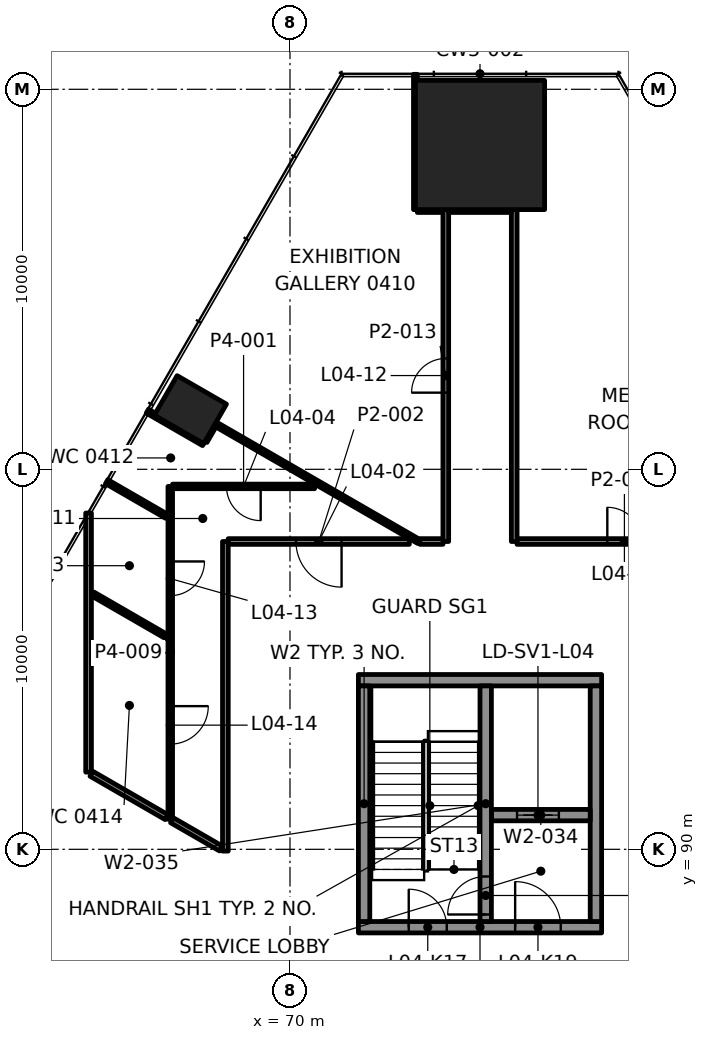
"""IFC4 building model, lengths in metres.
Left out: names, types, materials, properties, quantities, classifications, styles, units other than length and angle.
Written with IfcOpenShell. Run it as: python <this file> out.ifc"""

import sys

from ifc_helpers import new_model, si_unit, direction, frame, frame_2d, origin, origin_2d, place, context, subcontext, project, spatial, rectangle, extrude, element, fill, save


model = new_model("IFC4")
c1 = context("Model", 3, precision=1e-05, world=origin(), true_north=direction((0.0, 1.0)))
c2 = subcontext(c1, "Body", "Model", "MODEL_VIEW")
j1 = project(units=[si_unit("LENGTHUNIT", "METRE"), si_unit("PLANEANGLEUNIT", "RADIAN")], contexts=[c1])
p1 = place(None, origin())
s1 = spatial("IfcSite", under=j1, at=p1, CompositionType="ELEMENT")
p2 = place(p1, origin())
s2 = spatial("IfcBuilding", under=s1, at=p2, CompositionType="ELEMENT")
p3 = place(p2, frame((0.0, 0.0, 21.8)))
s3 = spatial("IfcBuildingStorey", under=s2, at=p3, CompositionType="ELEMENT", Elevation=21.8)
p4 = place(p3, frame((75.0, 108.534, 0.0), z_axis=(0.0, 0.0, 1.0), x_axis=(-1.0, 0.0, 0.0)))
e1 = element("IfcColumn", 1, at=p4, inside=s3, PredefinedType="COLUMN", context=c2, shape_type="SweptSolid", body=[
    extrude(rectangle(XDim=3.4, YDim=3.4, at=origin_2d()), origin(), (0.0, 0.0, 1.0), 4.6),
])
p5 = place(p3, frame((67.379, 101.57, -0.0), z_axis=(0.0, 0.0, 1.0), x_axis=(-0.5, -0.866025403784, 0.0)))
e2 = element("IfcColumn", 2, at=p5, inside=s3, PredefinedType="COLUMN", context=c2, shape_type="SweptSolid", body=[
    extrude(rectangle(XDim=1.2, YDim=1.5, at=origin_2d()), origin(), (0.0, 0.0, 1.0), 4.6),
])
p6 = place(p3, frame((71.8, 87.95, 0.0), z_axis=(0.0, 0.0, 1.0), x_axis=(1.0, 0.0, 0.0)))
e3 = element("IfcWall", 3, at=p6, inside=s3, PredefinedType="SHEAR", context=c2, shape_type="SweptSolid", body=[
    extrude(rectangle(XDim=6.4, YDim=0.3, at=frame_2d((3.2, 0.0))), origin(), (0.0, 0.0, 1.0), 4.3),
])
p7 = place(p6, frame((1.325, 0.0, 0.0)))
e4 = element("IfcOpeningElement", 4, at=p7, cuts=e3, PredefinedType="OPENING", context=c2, shape_type="SweptSolid", body=[
    extrude(rectangle(XDim=1.0, YDim=2.1, at=frame_2d((0.5, 1.05))), frame((0.0, 0.16, 0.0), z_axis=(0.0, -1.0, 0.0), x_axis=(1.0, 0.0, 0.0)), (0.0, 0.0, 1.0), 0.32),
])
p8 = place(p6, frame((4.125, 0.0, 0.0)))
e5 = element("IfcOpeningElement", 5, at=p8, cuts=e3, PredefinedType="OPENING", context=c2, shape_type="SweptSolid", body=[
    extrude(rectangle(XDim=1.2, YDim=2.1, at=frame_2d((0.6, 1.05))), frame((0.0, 0.16, 0.0), z_axis=(0.0, -1.0, 0.0), x_axis=(1.0, 0.0, 0.0)), (0.0, 0.0, 1.0), 0.32),
])
p9 = place(p3, frame((71.8, 94.45, 0.0), z_axis=(0.0, 0.0, 1.0), x_axis=(1.0, 0.0, 0.0)))
e6 = element("IfcWall", 6, at=p9, inside=s3, PredefinedType="SHEAR", context=c2, shape_type="SweptSolid", body=[
    extrude(rectangle(XDim=6.4, YDim=0.3, at=frame_2d((3.2, 0.0))), origin(), (0.0, 0.0, 1.0), 4.3),
])
for number, where, z_axis, x_axis in (
    (7, (71.95, 88.1, 0.0), (0.0, 0.0, 1.0), (0.0, 1.0, 0.0)),
    (8, (78.05, 88.1, 0.0), (0.0, 0.0, 1.0), (0.0, 1.0, 0.0)),
):
    element("IfcWall", number, at=place(p3, frame(where, z_axis=z_axis, x_axis=x_axis)), inside=s3, PredefinedType="SHEAR", context=c2, shape_type="SweptSolid", body=[
        extrude(rectangle(XDim=6.2, YDim=0.3, at=frame_2d((3.1, 0.0))), origin(), (0.0, 0.0, 1.0), 4.3),
    ])
p10 = place(p3, frame((75.3, 90.9, 0.0), z_axis=(0.0, 0.0, 1.0), x_axis=(1.0, 0.0, 0.0)))
e9 = element("IfcWall", 9, at=p10, inside=s3, PredefinedType="SHEAR", context=c2, shape_type="SweptSolid", body=[
    extrude(rectangle(XDim=2.6, YDim=0.3, at=frame_2d((1.3, 0.0))), origin(), (0.0, 0.0, 1.0), 4.3),
])
p11 = place(p10, frame((0.675, 0.0, 0.0)))
e10 = element("IfcOpeningElement", 10, at=p11, cuts=e9, PredefinedType="OPENING", context=c2, shape_type="SweptSolid", body=[
    extrude(rectangle(XDim=1.1, YDim=2.1, at=frame_2d((0.55, 1.05))), frame((0.0, 0.16, 0.0), z_axis=(0.0, -1.0, 0.0), x_axis=(1.0, 0.0, 0.0)), (0.0, 0.0, 1.0), 0.32),
])
p12 = place(p3, frame((75.15, 88.1, 0.0), z_axis=(0.0, 0.0, 1.0), x_axis=(0.0, 1.0, 0.0)))
e11 = element("IfcWall", 11, at=p12, inside=s3, PredefinedType="SHEAR", context=c2, shape_type="SweptSolid", body=[
    extrude(rectangle(XDim=6.2, YDim=0.3, at=frame_2d((3.1, 0.0))), origin(), (0.0, 0.0, 1.0), 4.3),
])
p13 = place(p12, frame((0.185, 0.0, 0.0)))
e12 = element("IfcOpeningElement", 12, at=p13, cuts=e11, PredefinedType="OPENING", context=c2, shape_type="SweptSolid", body=[
    extrude(rectangle(XDim=1.0, YDim=2.1, at=frame_2d((0.5, 1.05))), frame((0.0, 0.16, 0.0), z_axis=(0.0, -1.0, 0.0), x_axis=(1.0, 0.0, 0.0)), (0.0, 0.0, 1.0), 0.32),
])
p14 = place(p3, frame((73.14, 98.1, 0.0), z_axis=(0.0, 0.0, 1.0), x_axis=(-1.0, 0.0, 0.0)))
e13 = element("IfcWall", 13, at=p14, inside=s3, PredefinedType="PARTITIONING", context=c2, shape_type="SweptSolid", body=[
    extrude(rectangle(XDim=4.765, YDim=0.15, at=frame_2d((2.382, 0.0))), origin(), (0.0, 0.0, 1.0), 3.7),
])
p15 = place(p14, frame((1.782, 0.0, 0.0)))
e14 = element("IfcOpeningElement", 14, at=p15, cuts=e13, PredefinedType="OPENING", context=c2, shape_type="SweptSolid", body=[
    extrude(rectangle(XDim=1.2, YDim=2.1, at=frame_2d((0.6, 1.05))), frame((0.0, 0.085, 0.0), z_axis=(0.0, -1.0, 0.0), x_axis=(1.0, 0.0, 0.0)), (0.0, 0.0, 1.0), 0.17),
])
p16 = place(p3, frame((75.975, 98.1, 0.0), z_axis=(0.0, 0.0, 1.0), x_axis=(1.0, 0.0, 0.0)))
e15 = element("IfcWall", 15, at=p16, inside=s3, PredefinedType="PARTITIONING", context=c2, shape_type="SweptSolid", body=[
    extrude(rectangle(XDim=5.649, YDim=0.15, at=frame_2d((2.825, 0.0))), origin(), (0.0, 0.0, 1.0), 3.7),
])
p17 = place(p16, frame((2.375, 0.0, 0.0)))
e16 = element("IfcOpeningElement", 16, at=p17, cuts=e15, PredefinedType="OPENING", context=c2, shape_type="SweptSolid", body=[
    extrude(rectangle(XDim=0.9, YDim=2.1, at=frame_2d((0.45, 1.05))), frame((0.0, 0.085, 0.0), z_axis=(0.0, -1.0, 0.0), x_axis=(1.0, 0.0, 0.0)), (0.0, 0.0, 1.0), 0.17),
])
p18 = place(p3, frame((70.648, 99.55, 0.0), z_axis=(0.0, 0.0, 1.0), x_axis=(-1.0, 0.0, 0.0)))
e17 = element("IfcWall", 17, at=p18, inside=s3, PredefinedType="PARTITIONING", context=c2, shape_type="SweptSolid", body=[
    extrude(rectangle(XDim=3.738, YDim=0.12, at=frame_2d((1.869, 0.0))), origin(), (0.0, 0.0, 1.0), 3.7),
])
p19 = place(p18, frame((1.419, 0.0, 0.0)))
e18 = element("IfcOpeningElement", 18, at=p19, cuts=e17, PredefinedType="OPENING", context=c2, shape_type="SweptSolid", body=[
    extrude(rectangle(XDim=0.9, YDim=2.1, at=frame_2d((0.45, 1.05))), frame((0.0, 0.07, 0.0), z_axis=(0.0, -1.0, 0.0), x_axis=(1.0, 0.0, 0.0)), (0.0, 0.0, 1.0), 0.14),
])
p20 = place(p3, frame((73.351, 106.834, 0.0), z_axis=(0.0, 0.0, 1.0), x_axis=(1.0, 0.0, 0.0)))
e19 = element("IfcWall", 19, at=p20, inside=s3, PredefinedType="PARTITIONING", context=c2, shape_type="SweptSolid", body=[
    extrude(rectangle(XDim=0.674, YDim=0.15, at=frame_2d((0.337, 0.0))), origin(), (0.0, 0.0, 1.0), 3.7),
])
p21 = place(p3, frame((67.764, 100.736, 0.0), z_axis=(0.0, 0.0, 1.0), x_axis=(0.500217018202, 0.865900072007, 0.0)))
e20 = element("IfcWall", 20, at=p21, inside=s3, PredefinedType="PARTITIONING", context=c2, shape_type="SweptSolid", body=[
    extrude(rectangle(XDim=0.47, YDim=0.12, at=frame_2d((0.235, 0.0))), origin(), (0.0, 0.0, 1.0), 3.7),
])
p22 = place(p3, frame((75.9, 98.1, 0.0), z_axis=(0.0, 0.0, 1.0), x_axis=(0.0, 1.0, 0.0)))
e21 = element("IfcWall", 21, at=p22, inside=s3, PredefinedType="PARTITIONING", context=c2, shape_type="SweptSolid", body=[
    extrude(rectangle(XDim=8.733, YDim=0.15, at=frame_2d((4.367, 0.0))), origin(), (0.0, 0.0, 1.0), 3.7),
])
p23 = place(p3, frame((74.1, 98.1, 0.0), z_axis=(0.0, 0.0, 1.0), x_axis=(0.0, 1.0, 0.0)))
e22 = element("IfcWall", 22, at=p23, inside=s3, PredefinedType="PARTITIONING", context=c2, shape_type="SweptSolid", body=[
    extrude(rectangle(XDim=8.734, YDim=0.15, at=frame_2d((4.367, 0.0))), origin(), (0.0, 0.0, 1.0), 3.7),
])
p24 = place(p23, frame((3.917, 0.0, 0.0)))
e23 = element("IfcOpeningElement", 23, at=p24, cuts=e22, PredefinedType="OPENING", context=c2, shape_type="SweptSolid", body=[
    extrude(rectangle(XDim=0.9, YDim=2.1, at=frame_2d((0.45, 1.05))), frame((0.0, 0.085, 0.0), z_axis=(0.0, -1.0, 0.0), x_axis=(1.0, 0.0, 0.0)), (0.0, 0.0, 1.0), 0.17),
])
p25 = place(p3, frame((73.3, 106.834, 0.0), z_axis=(0.0, 0.0, 1.0), x_axis=(0.0, 1.0, 0.0)))
e24 = element("IfcWall", 24, at=p25, inside=s3, PredefinedType="PARTITIONING", context=c2, shape_type="SweptSolid", body=[
    extrude(rectangle(XDim=3.56, YDim=0.1, at=frame_2d((1.78, 0.0))), origin(), (0.0, 0.0, 1.0), 3.7),
])
p26 = place(p3, frame((68.3, 89.953, 0.0), z_axis=(0.0, 0.0, 1.0), x_axis=(0.0, 1.0, 0.0)))
e25 = element("IfcWall", 25, at=p26, inside=s3, PredefinedType="PARTITIONING", context=c2, shape_type="SweptSolid", body=[
    extrude(rectangle(XDim=8.147, YDim=0.15, at=frame_2d((4.073, 0.0))), origin(), (0.0, 0.0, 1.0), 3.7),
])
p27 = place(p3, frame((66.85, 99.55, 0.0), z_axis=(0.0, 0.0, 1.0), x_axis=(0.0, -1.0, 0.0)))
e26 = element("IfcWall", 26, at=p27, inside=s3, PredefinedType="PARTITIONING", context=c2, shape_type="SweptSolid", body=[
    extrude(rectangle(XDim=8.76, YDim=0.12, at=frame_2d((4.38, 0.0))), origin(), (0.0, 0.0, 1.0), 3.7),
])
p28 = place(p27, frame((1.975, 0.0, 0.0)))
e27 = element("IfcOpeningElement", 27, at=p28, cuts=e26, PredefinedType="OPENING", context=c2, shape_type="SweptSolid", body=[
    extrude(rectangle(XDim=0.9, YDim=2.1, at=frame_2d((0.45, 1.05))), frame((0.0, 0.07, 0.0), z_axis=(0.0, -1.0, 0.0), x_axis=(1.0, 0.0, 0.0)), (0.0, 0.0, 1.0), 0.14),
])
p29 = place(p27, frame((5.782, 0.0, 0.0)))
e28 = element("IfcOpeningElement", 28, at=p29, cuts=e26, PredefinedType="OPENING", context=c2, shape_type="SweptSolid", body=[
    extrude(rectangle(XDim=1.0, YDim=2.1, at=frame_2d((0.5, 1.05))), frame((0.0, 0.07, 0.0), z_axis=(0.0, -1.0, 0.0), x_axis=(1.0, 0.0, 0.0)), (0.0, 0.0, 1.0), 0.14),
])
p30 = place(p3, frame((64.7, 92.032, 0.0), z_axis=(0.0, 0.0, 1.0), x_axis=(0.0, 1.0, 0.0)))
e29 = element("IfcWall", 29, at=p30, inside=s3, PredefinedType="PARTITIONING", context=c2, shape_type="SweptSolid", body=[
    extrude(rectangle(XDim=6.817, YDim=0.15, at=frame_2d((3.409, 0.0))), origin(), (0.0, 0.0, 1.0), 3.465),
])
p31 = place(p3, frame((73.39, 98.1, 0.0), z_axis=(0.0, 0.0, 1.0), x_axis=(-0.866023351941, 0.500003553881, 0.0)))
e30 = element("IfcWall", 30, at=p31, inside=s3, PredefinedType="PARTITIONING", context=c2, shape_type="SweptSolid", body=[
    extrude(rectangle(XDim=6.19, YDim=0.12, at=frame_2d((3.095, 0.0))), origin(), (0.0, 0.0, 1.0), 3.7),
])
p32 = place(p3, frame((67.729, 100.676, 0.0), z_axis=(0.0, 0.0, 1.0), x_axis=(-0.866038183914, 0.499977863513, 0.0)))
e31 = element("IfcWall", 31, at=p32, inside=s3, PredefinedType="PARTITIONING", context=c2, shape_type="SweptSolid", body=[
    extrude(rectangle(XDim=1.71, YDim=0.12, at=frame_2d((0.855, 0.0))), origin(), (0.0, 0.0, 1.0), 3.465),
])
p33 = place(p3, frame((66.755, 98.763, 0.0), z_axis=(0.0, 0.0, 1.0), x_axis=(-0.866067396205, 0.49992725994, 0.0)))
e32 = element("IfcWall", 32, at=p33, inside=s3, PredefinedType="PARTITIONING", context=c2, shape_type="SweptSolid", body=[
    extrude(rectangle(XDim=1.823, YDim=0.12, at=frame_2d((0.912, 0.0))), origin(), (0.0, 0.0, 1.0), 3.465),
])
p34 = place(p3, frame((66.755, 95.596, 0.0), z_axis=(0.0, 0.0, 1.0), x_axis=(-0.866001014111, 0.500042241774, 0.0)))
e33 = element("IfcWall", 33, at=p34, inside=s3, PredefinedType="PARTITIONING", context=c2, shape_type="SweptSolid", body=[
    extrude(rectangle(XDim=2.247, YDim=0.12, at=frame_2d((1.124, 0.0))), origin(), (0.0, 0.0, 1.0), 3.7),
])
p35 = place(p3, frame((68.182, 90.022, 0.0), z_axis=(0.0, 0.0, 1.0), x_axis=(-0.865999496279, 0.500044870432, 0.0)))
e34 = element("IfcWall", 34, at=p35, inside=s3, PredefinedType="PARTITIONING", context=c2, shape_type="SweptSolid", body=[
    extrude(rectangle(XDim=1.486, YDim=0.15, at=frame_2d((0.743, 0.0))), origin(), (0.0, 0.0, 1.0), 3.7),
])
p36 = place(p3, frame((73.42, 98.1, 0.0), z_axis=(0.0, 0.0, 1.0), x_axis=(1.0, 0.0, 0.0)))
e35 = element("IfcWall", 35, at=p36, inside=s3, PredefinedType="PARTITIONING", context=c2, shape_type="SweptSolid", body=[
    extrude(rectangle(XDim=0.605, YDim=0.15, at=frame_2d((0.303, 0.0))), origin(), (0.0, 0.0, 1.0), 3.7),
])
p37 = place(p3, frame((74.175, 106.834, 0.0), z_axis=(0.0, 0.0, 1.0), x_axis=(1.0, 0.0, 0.0)))
e36 = element("IfcWall", 36, at=p37, inside=s3, PredefinedType="PARTITIONING", context=c2, shape_type="SweptSolid", body=[
    extrude(rectangle(XDim=1.649, YDim=0.15, at=frame_2d((0.825, 0.0))), origin(), (0.0, 0.0, 1.0), 3.697),
])
p38 = place(p3, frame((66.752, 90.847, 0.0), z_axis=(0.0, 0.0, 1.0), x_axis=(-0.866023543838, 0.500003221507, 0.0)))
e37 = element("IfcWall", 37, at=p38, inside=s3, PredefinedType="PARTITIONING", context=c2, shape_type="SweptSolid", body=[
    extrude(rectangle(XDim=2.283, YDim=0.15, at=frame_2d((1.142, 0.0))), origin(), (0.0, 0.0, 1.0), 3.7),
])
p39 = place(p15, origin())
e38 = element("IfcDoor", 38, at=p39, inside=s3, OperationType="DOUBLE_DOOR_SINGLE_SWING", PredefinedType="DOOR", context=c2, shape_type="SweptSolid", body=[
    extrude(rectangle(XDim=1.2, YDim=2.1, at=frame_2d((0.6, 1.05))), frame((0.0, 0.025, 0.0), z_axis=(0.0, -1.0, 0.0), x_axis=(1.0, 0.0, 0.0)), (0.0, 0.0, 1.0), 0.05),
])
fill(e14, e38)
p40 = place(p17, origin())
e39 = element("IfcDoor", 39, at=p40, inside=s3, OperationType="SINGLE_SWING_RIGHT", PredefinedType="DOOR", context=c2, shape_type="SweptSolid", body=[
    extrude(rectangle(XDim=0.9, YDim=2.1, at=frame_2d((0.45, 1.05))), frame((0.0, 0.025, 0.0), z_axis=(0.0, -1.0, 0.0), x_axis=(1.0, 0.0, 0.0)), (0.0, 0.0, 1.0), 0.05),
])
fill(e16, e39)
p41 = place(p19, origin())
e40 = element("IfcDoor", 40, at=p41, inside=s3, OperationType="SINGLE_SWING_RIGHT", PredefinedType="DOOR", context=c2, shape_type="SweptSolid", body=[
    extrude(rectangle(XDim=0.9, YDim=2.1, at=frame_2d((0.45, 1.05))), frame((0.0, 0.025, 0.0), z_axis=(0.0, -1.0, 0.0), x_axis=(1.0, 0.0, 0.0)), (0.0, 0.0, 1.0), 0.05),
])
fill(e18, e40)
p42 = place(p24, origin())
e41 = element("IfcDoor", 41, at=p42, inside=s3, OperationType="SINGLE_SWING_LEFT", PredefinedType="DOOR", context=c2, shape_type="SweptSolid", body=[
    extrude(rectangle(XDim=0.9, YDim=2.1, at=frame_2d((0.45, 1.05))), frame((0.0, 0.025, 0.0), z_axis=(0.0, -1.0, 0.0), x_axis=(1.0, 0.0, 0.0)), (0.0, 0.0, 1.0), 0.05),
])
fill(e23, e41)
p43 = place(p28, origin())
e42 = element("IfcDoor", 42, at=p43, inside=s3, OperationType="SINGLE_SWING_LEFT", PredefinedType="DOOR", context=c2, shape_type="SweptSolid", body=[
    extrude(rectangle(XDim=0.9, YDim=2.1, at=frame_2d((0.45, 1.05))), frame((0.0, 0.025, 0.0), z_axis=(0.0, -1.0, 0.0), x_axis=(1.0, 0.0, 0.0)), (0.0, 0.0, 1.0), 0.05),
])
fill(e27, e42)
p44 = place(p29, origin())
e43 = element("IfcDoor", 43, at=p44, inside=s3, OperationType="SINGLE_SWING_RIGHT", PredefinedType="DOOR", context=c2, shape_type="SweptSolid", body=[
    extrude(rectangle(XDim=1.0, YDim=2.1, at=frame_2d((0.5, 1.05))), frame((0.0, 0.025, 0.0), z_axis=(0.0, -1.0, 0.0), x_axis=(1.0, 0.0, 0.0)), (0.0, 0.0, 1.0), 0.05),
])
fill(e28, e43)
p45 = place(p11, origin())
e44 = element("IfcDoor", 44, at=p45, inside=s3, OperationType="DOUBLE_DOOR_SLIDING", PredefinedType="DOOR", context=c2, shape_type="SweptSolid", body=[
    extrude(rectangle(XDim=1.1, YDim=2.1, at=frame_2d((0.55, 1.05))), frame((0.0, 0.025, 0.0), z_axis=(0.0, -1.0, 0.0), x_axis=(1.0, 0.0, 0.0)), (0.0, 0.0, 1.0), 0.05),
])
fill(e10, e44)
p46 = place(p7, origin())
e45 = element("IfcDoor", 45, at=p46, inside=s3, OperationType="SINGLE_SWING_RIGHT", PredefinedType="DOOR", context=c2, shape_type="SweptSolid", body=[
    extrude(rectangle(XDim=1.0, YDim=2.1, at=frame_2d((0.5, 1.05))), frame((0.0, 0.025, 0.0), z_axis=(0.0, -1.0, 0.0), x_axis=(1.0, 0.0, 0.0)), (0.0, 0.0, 1.0), 0.05),
])
fill(e4, e45)
p47 = place(p13, origin())
e46 = element("IfcDoor", 46, at=p47, inside=s3, OperationType="SINGLE_SWING_LEFT", PredefinedType="DOOR", context=c2, shape_type="SweptSolid", body=[
    extrude(rectangle(XDim=1.0, YDim=2.1, at=frame_2d((0.5, 1.05))), frame((0.0, 0.025, 0.0), z_axis=(0.0, -1.0, 0.0), x_axis=(1.0, 0.0, 0.0)), (0.0, 0.0, 1.0), 0.05),
])
fill(e12, e46)
p48 = place(p8, origin())
e47 = element("IfcDoor", 47, at=p48, inside=s3, OperationType="SINGLE_SWING_RIGHT", PredefinedType="DOOR", context=c2, shape_type="SweptSolid", body=[
    extrude(rectangle(XDim=1.2, YDim=2.1, at=frame_2d((0.6, 1.05))), frame((0.0, 0.025, 0.0), z_axis=(0.0, -1.0, 0.0), x_axis=(1.0, 0.0, 0.0)), (0.0, 0.0, 1.0), 0.05),
])
fill(e5, e47)
save(model, sys.argv[1])
